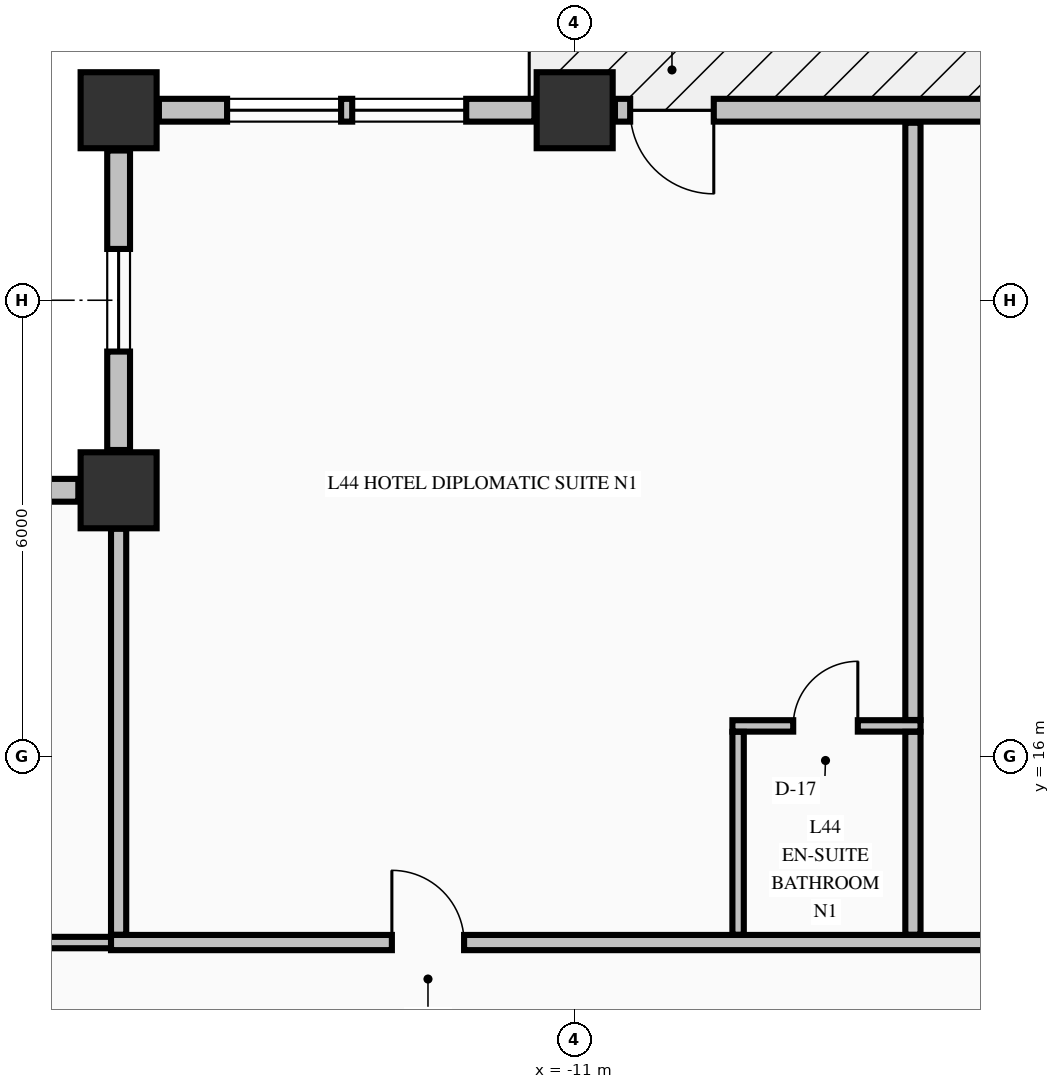
"""IFC4 building model, lengths in metres.
Left out: names, types, materials, properties, quantities, classifications, styles, units other than length and angle.
Written with IfcOpenShell. Run it as: python <this file> out.ifc"""

import sys

from ifc_helpers import new_model, si_unit, direction, frame, frame_2d, origin, origin_2d, place, context, subcontext, project, spatial, rectangle, extrude, element, fill, save


model = new_model("IFC4")
c1 = context("Model", 3, precision=1e-05, world=origin(), true_north=direction((0.0, 1.0)))
c2 = subcontext(c1, "Body", "Model", "MODEL_VIEW")
j1 = project(units=[si_unit("LENGTHUNIT", "METRE"), si_unit("PLANEANGLEUNIT", "RADIAN")], contexts=[c1])
p1 = place(None, origin())
s1 = spatial("IfcSite", under=j1, at=p1, CompositionType="ELEMENT")
p2 = place(p1, origin())
s2 = spatial("IfcBuilding", under=s1, at=p2, CompositionType="ELEMENT")
p3 = place(p2, frame((0.0, 0.0, 172.86)))
s3 = spatial("IfcBuildingStorey", under=s2, at=p3, CompositionType="ELEMENT", Elevation=172.86)
for number, where, z_axis, x_axis in (
    (1, (-17.0, 24.5, -0.25), (0.0, 0.0, 1.0), (1.0, 0.0, 0.0)),
    (2, (-11.0, 24.5, -0.25), (0.0, 0.0, 1.0), (1.0, 0.0, 0.0)),
    (3, (-17.0, 19.5, -0.25), (0.0, 0.0, 1.0), (1.0, 0.0, 0.0)),
):
    element("IfcColumn", number, at=place(p3, frame(where, z_axis=z_axis, x_axis=x_axis)), inside=s3, PredefinedType="COLUMN", context=c2, shape_type="SweptSolid", body=[
        extrude(rectangle(XDim=1.0, YDim=1.0, at=origin_2d()), origin(), (0.0, 0.0, 1.0), 3.375),
    ])
p4 = place(p3, frame((-17.0, 23.97, 0.0), z_axis=(0.0, 0.0, 1.0), x_axis=(0.0, -1.0, 0.0)))
e4 = element("IfcWall", 4, at=p4, inside=s3, PredefinedType="STANDARD", context=c2, shape_type="SweptSolid", body=[
    extrude(rectangle(XDim=3.94, YDim=0.3, at=frame_2d((1.97, 0.0))), origin(), (0.0, 0.0, 1.0), 2.517),
])
p5 = place(p4, frame((1.295, 0.0, 0.68)))
e5 = element("IfcOpeningElement", 5, at=p5, cuts=e4, PredefinedType="OPENING", context=c2, shape_type="SweptSolid", body=[
    extrude(rectangle(XDim=1.35, YDim=1.42, at=frame_2d((0.675, 0.71))), frame((0.0, 0.16, 0.0), z_axis=(0.0, -1.0, 0.0), x_axis=(1.0, 0.0, 0.0)), (0.0, 0.0, 1.0), 0.32),
])
p6 = place(p3, frame((-17.53, 19.5, 0.0), z_axis=(0.0, 0.0, 1.0), x_axis=(-1.0, 0.0, 0.0)))
e6 = element("IfcWall", 6, at=p6, inside=s3, PredefinedType="STANDARD", context=c2, shape_type="SweptSolid", body=[
    extrude(rectangle(XDim=3.94, YDim=0.3, at=frame_2d((1.97, 0.0))), origin(), (0.0, 0.0, 1.0), 2.517),
])
p7 = place(p6, frame((1.295, 0.0, 0.68)))
e7 = element("IfcOpeningElement", 7, at=p7, cuts=e6, PredefinedType="OPENING", context=c2, shape_type="SweptSolid", body=[
    extrude(rectangle(XDim=1.35, YDim=1.42, at=frame_2d((0.675, 0.71))), frame((0.0, 0.16, 0.0), z_axis=(0.0, -1.0, 0.0), x_axis=(1.0, 0.0, 0.0)), (0.0, 0.0, 1.0), 0.32),
])
p8 = place(p3, frame((-11.53, 24.5, 0.0), z_axis=(0.0, 0.0, 1.0), x_axis=(-1.0, 0.0, 0.0)))
e8 = element("IfcWall", 8, at=p8, inside=s3, PredefinedType="STANDARD", context=c2, shape_type="SweptSolid", body=[
    extrude(rectangle(XDim=4.94, YDim=0.3, at=frame_2d((2.47, 0.0))), origin(), (0.0, 0.0, 1.0), 2.517),
])
p9 = place(p8, frame((0.897, 0.0, 0.72)))
e9 = element("IfcOpeningElement", 9, at=p9, cuts=e8, PredefinedType="OPENING", context=c2, shape_type="SweptSolid", body=[
    extrude(rectangle(XDim=1.5, YDim=1.6, at=frame_2d((0.75, 0.8))), frame((0.0, 0.16, 0.0), z_axis=(0.0, -1.0, 0.0), x_axis=(1.0, 0.0, 0.0)), (0.0, 0.0, 1.0), 0.32),
])
p10 = place(p8, frame((2.543, 0.0, 0.72)))
e10 = element("IfcOpeningElement", 10, at=p10, cuts=e8, PredefinedType="OPENING", context=c2, shape_type="SweptSolid", body=[
    extrude(rectangle(XDim=1.5, YDim=1.6, at=frame_2d((0.75, 0.8))), frame((0.0, 0.16, 0.0), z_axis=(0.0, -1.0, 0.0), x_axis=(1.0, 0.0, 0.0)), (0.0, 0.0, 1.0), 0.32),
])
p11 = place(p3, frame((-0.53, 24.5, 0.0), z_axis=(0.0, 0.0, 1.0), x_axis=(-1.0, 0.0, 0.0)))
e11 = element("IfcWall", 11, at=p11, inside=s3, PredefinedType="STANDARD", context=c2, shape_type="SweptSolid", body=[
    extrude(rectangle(XDim=9.94, YDim=0.3, at=frame_2d((4.97, 0.0))), origin(), (0.0, 0.0, 1.0), 2.517),
])
p12 = place(p11, frame((8.64, 0.0, 0.0)))
e12 = element("IfcOpeningElement", 12, at=p12, cuts=e11, PredefinedType="OPENING", context=c2, shape_type="SweptSolid", body=[
    extrude(rectangle(XDim=1.1, YDim=2.15, at=frame_2d((0.55, 1.075))), frame((0.0, 0.16, 0.0), z_axis=(0.0, -1.0, 0.0), x_axis=(1.0, 0.0, 0.0)), (0.0, 0.0, 1.0), 0.32),
])
p13 = place(p11, frame((1.238, 0.0, 0.72)))
e13 = element("IfcOpeningElement", 13, at=p13, cuts=e11, PredefinedType="OPENING", context=c2, shape_type="SweptSolid", body=[
    extrude(rectangle(XDim=1.5, YDim=1.6, at=frame_2d((0.75, 0.8))), frame((0.0, 0.16, 0.0), z_axis=(0.0, -1.0, 0.0), x_axis=(1.0, 0.0, 0.0)), (0.0, 0.0, 1.0), 0.32),
])
p14 = place(p11, frame((3.226, 0.0, 0.72)))
e14 = element("IfcOpeningElement", 14, at=p14, cuts=e11, PredefinedType="OPENING", context=c2, shape_type="SweptSolid", body=[
    extrude(rectangle(XDim=1.5, YDim=1.6, at=frame_2d((0.75, 0.8))), frame((0.0, 0.16, 0.0), z_axis=(0.0, -1.0, 0.0), x_axis=(1.0, 0.0, 0.0)), (0.0, 0.0, 1.0), 0.32),
])
p15 = place(p3, frame((-20.075, 13.55, 0.0), z_axis=(0.0, 0.0, 1.0), x_axis=(1.0, 0.0, 0.0)))
e15 = element("IfcWall", 15, at=p15, inside=s3, PredefinedType="PARTITIONING", context=c2, shape_type="SweptSolid", body=[
    extrude(rectangle(XDim=3.175, YDim=0.15, at=frame_2d((1.587, 0.0))), origin(), (0.0, 0.0, 1.0), 3.125),
])
p16 = place(p3, frame((-17.1, 13.55, 0.0), z_axis=(0.0, 0.0, 1.0), x_axis=(1.0, 0.0, 0.0)))
e16 = element("IfcWall", 16, at=p16, inside=s3, PredefinedType="PARTITIONING", context=c2, shape_type="SweptSolid", body=[
    extrude(rectangle(XDim=39.2, YDim=0.2, at=frame_2d((19.6, 0.0))), origin(), (0.0, 0.0, 1.0), 3.125),
])
p17 = place(p16, frame((3.695, 0.0, 0.0)))
e17 = element("IfcOpeningElement", 17, at=p17, cuts=e16, PredefinedType="OPENING", context=c2, shape_type="SweptSolid", body=[
    extrude(rectangle(XDim=0.95, YDim=2.15, at=frame_2d((0.475, 1.075))), frame((0.0, 0.11, 0.0), z_axis=(0.0, -1.0, 0.0), x_axis=(1.0, 0.0, 0.0)), (0.0, 0.0, 1.0), 0.22),
])
p18 = place(p16, frame((11.695, 0.0, 0.0)))
e18 = element("IfcOpeningElement", 18, at=p18, cuts=e16, PredefinedType="OPENING", context=c2, shape_type="SweptSolid", body=[
    extrude(rectangle(XDim=0.95, YDim=2.15, at=frame_2d((0.475, 1.075))), frame((0.0, 0.11, 0.0), z_axis=(0.0, -1.0, 0.0), x_axis=(1.0, 0.0, 0.0)), (0.0, 0.0, 1.0), 0.22),
])
p19 = place(p16, frame((17.125, 0.0, 0.0)))
e19 = element("IfcOpeningElement", 19, at=p19, cuts=e16, PredefinedType="OPENING", context=c2, shape_type="SweptSolid", body=[
    extrude(rectangle(XDim=0.95, YDim=2.15, at=frame_2d((0.475, 1.075))), frame((0.0, 0.11, 0.0), z_axis=(0.0, -1.0, 0.0), x_axis=(1.0, 0.0, 0.0)), (0.0, 0.0, 1.0), 0.22),
])
p20 = place(p16, frame((25.325, 0.0, 0.0)))
e20 = element("IfcOpeningElement", 20, at=p20, cuts=e16, PredefinedType="OPENING", context=c2, shape_type="SweptSolid", body=[
    extrude(rectangle(XDim=0.95, YDim=2.15, at=frame_2d((0.475, 1.075))), frame((0.0, 0.11, 0.0), z_axis=(0.0, -1.0, 0.0), x_axis=(1.0, 0.0, 0.0)), (0.0, 0.0, 1.0), 0.22),
])
p21 = place(p16, frame((33.695, 0.0, 0.0)))
e21 = element("IfcOpeningElement", 21, at=p21, cuts=e16, PredefinedType="OPENING", context=c2, shape_type="SweptSolid", body=[
    extrude(rectangle(XDim=0.95, YDim=2.15, at=frame_2d((0.475, 1.075))), frame((0.0, 0.11, 0.0), z_axis=(0.0, -1.0, 0.0), x_axis=(1.0, 0.0, 0.0)), (0.0, 0.0, 1.0), 0.22),
])
p22 = place(p3, frame((-8.925, 16.4, 0.0), z_axis=(0.0, 0.0, 1.0), x_axis=(1.0, 0.0, 0.0)))
e22 = element("IfcWall", 22, at=p22, inside=s3, PredefinedType="PARTITIONING", context=c2, shape_type="SweptSolid", body=[
    extrude(rectangle(XDim=2.475, YDim=0.15, at=frame_2d((1.238, 0.0))), origin(), (0.0, 0.0, 1.0), 3.125),
])
p23 = place(p22, frame((0.8, 0.0, 0.0)))
e23 = element("IfcOpeningElement", 23, at=p23, cuts=e22, PredefinedType="OPENING", context=c2, shape_type="SweptSolid", body=[
    extrude(rectangle(XDim=0.85, YDim=2.1, at=frame_2d((0.425, 1.05))), frame((0.0, 0.085, 0.0), z_axis=(0.0, -1.0, 0.0), x_axis=(1.0, 0.0, 0.0)), (0.0, 0.0, 1.0), 0.17),
])
p24 = place(p3, frame((-17.0, 13.653, 0.0), z_axis=(0.0, 0.0, 1.0), x_axis=(0.0, 1.0, 0.0)))
e24 = element("IfcWall", 24, at=p24, inside=s3, PredefinedType="PARTITIONING", context=c2, shape_type="SweptSolid", body=[
    extrude(rectangle(XDim=5.341, YDim=0.2, at=frame_2d((2.67, 0.0))), origin(), (0.0, 0.0, 1.0), 3.125),
])
p25 = place(p3, frame((-8.85, 13.653, 0.0), z_axis=(0.0, 0.0, 1.0), x_axis=(0.0, 1.0, 0.0)))
e25 = element("IfcWall", 25, at=p25, inside=s3, PredefinedType="PARTITIONING", context=c2, shape_type="SweptSolid", body=[
    extrude(rectangle(XDim=2.669, YDim=0.15, at=frame_2d((1.334, 0.0))), origin(), (0.0, 0.0, 1.0), 3.125),
])
p26 = place(p3, frame((-6.55, 13.653, 0.0), z_axis=(0.0, 0.0, 1.0), x_axis=(0.0, 1.0, 0.0)))
e26 = element("IfcWall", 26, at=p26, inside=s3, PredefinedType="PARTITIONING", context=c2, shape_type="SweptSolid", body=[
    extrude(rectangle(XDim=2.669, YDim=0.2, at=frame_2d((1.334, 0.0))), origin(), (0.0, 0.0, 1.0), 3.125),
])
p27 = place(p3, frame((-6.55, 16.478, 0.0), z_axis=(0.0, 0.0, 1.0), x_axis=(0.0, 1.0, 0.0)))
e27 = element("IfcWall", 27, at=p27, inside=s3, PredefinedType="PARTITIONING", context=c2, shape_type="SweptSolid", body=[
    extrude(rectangle(XDim=7.857, YDim=0.2, at=frame_2d((3.928, 0.0))), origin(), (0.0, 0.0, 1.0), 3.125),
])
p28 = place(p5, origin())
e28 = element("IfcWindow", 28, at=p28, inside=s3, PartitioningType="SINGLE_PANEL", PredefinedType="WINDOW", context=c2, shape_type="SweptSolid", body=[
    extrude(rectangle(XDim=1.35, YDim=1.42, at=frame_2d((0.675, 0.71))), frame((0.0, 0.03, 0.0), z_axis=(0.0, -1.0, 0.0), x_axis=(1.0, 0.0, 0.0)), (0.0, 0.0, 1.0), 0.06),
])
fill(e5, e28)
p29 = place(p9, origin())
e29 = element("IfcWindow", 29, at=p29, inside=s3, PartitioningType="SINGLE_PANEL", PredefinedType="WINDOW", context=c2, shape_type="SweptSolid", body=[
    extrude(rectangle(XDim=1.5, YDim=1.6, at=frame_2d((0.75, 0.8))), frame((0.0, 0.03, 0.0), z_axis=(0.0, -1.0, 0.0), x_axis=(1.0, 0.0, 0.0)), (0.0, 0.0, 1.0), 0.06),
])
fill(e9, e29)
p30 = place(p10, origin())
e30 = element("IfcWindow", 30, at=p30, inside=s3, PartitioningType="SINGLE_PANEL", PredefinedType="WINDOW", context=c2, shape_type="SweptSolid", body=[
    extrude(rectangle(XDim=1.5, YDim=1.6, at=frame_2d((0.75, 0.8))), frame((0.0, 0.03, 0.0), z_axis=(0.0, -1.0, 0.0), x_axis=(1.0, 0.0, 0.0)), (0.0, 0.0, 1.0), 0.06),
])
fill(e10, e30)
p31 = place(p12, origin())
e31 = element("IfcDoor", 31, at=p31, inside=s3, OperationType="SINGLE_SWING_LEFT", PredefinedType="DOOR", context=c2, shape_type="SweptSolid", body=[
    extrude(rectangle(XDim=1.1, YDim=2.15, at=frame_2d((0.55, 1.075))), frame((0.0, 0.025, 0.0), z_axis=(0.0, -1.0, 0.0), x_axis=(1.0, 0.0, 0.0)), (0.0, 0.0, 1.0), 0.05),
])
fill(e12, e31)
p32 = place(p17, origin())
e32 = element("IfcDoor", 32, at=p32, inside=s3, OperationType="SINGLE_SWING_LEFT", PredefinedType="DOOR", context=c2, shape_type="SweptSolid", body=[
    extrude(rectangle(XDim=0.95, YDim=2.15, at=frame_2d((0.475, 1.075))), frame((0.0, 0.025, 0.0), z_axis=(0.0, -1.0, 0.0), x_axis=(1.0, 0.0, 0.0)), (0.0, 0.0, 1.0), 0.05),
])
fill(e17, e32)
p33 = place(p23, origin())
e33 = element("IfcDoor", 33, at=p33, inside=s3, OperationType="SINGLE_SWING_RIGHT", PredefinedType="DOOR", context=c2, shape_type="SweptSolid", body=[
    extrude(rectangle(XDim=0.85, YDim=2.1, at=frame_2d((0.425, 1.05))), frame((0.0, 0.025, 0.0), z_axis=(0.0, -1.0, 0.0), x_axis=(1.0, 0.0, 0.0)), (0.0, 0.0, 1.0), 0.05),
])
fill(e23, e33)
save(model, sys.argv[1])
